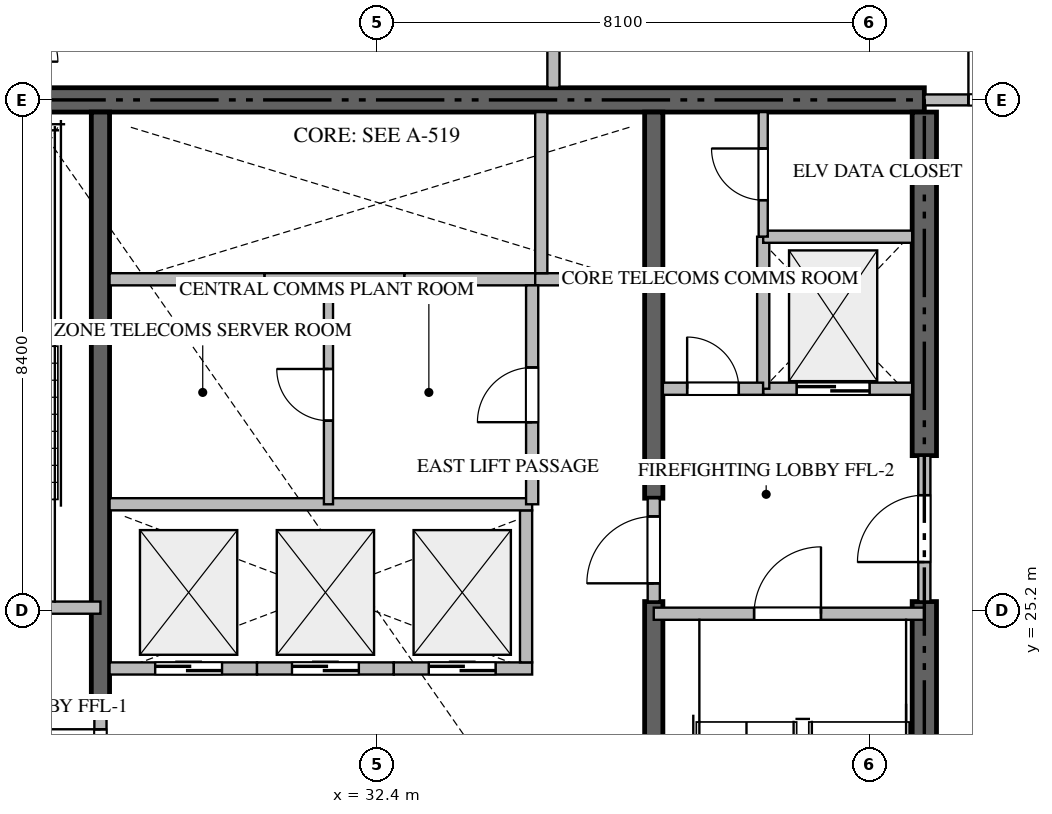
"""IFC4 building model, lengths in metres.
Left out: names, types, materials, properties, quantities, classifications, styles, units other than length and angle.
Written with IfcOpenShell. Run it as: python <this file> out.ifc"""

import sys

from ifc_helpers import new_model, si_unit, direction, frame, frame_2d, origin, place, context, subcontext, project, spatial, rectangle, extrude, source, transform, mapped, element, fill, save


model = new_model("IFC4")
c1 = context("Model", 3, precision=1e-05, world=origin(), true_north=direction((0.0, 1.0)))
c2 = subcontext(c1, "Body", "Model", "MODEL_VIEW")
j1 = project(units=[si_unit("LENGTHUNIT", "METRE"), si_unit("PLANEANGLEUNIT", "RADIAN")], contexts=[c1])
p1 = place(None, origin())
s1 = spatial("IfcSite", under=j1, at=p1, CompositionType="ELEMENT")
p2 = place(p1, origin())
s2 = spatial("IfcBuilding", under=s1, at=p2, CompositionType="ELEMENT")
p3 = place(p2, frame((0.0, 0.0, 150.15)))
s3 = spatial("IfcBuildingStorey", under=s2, at=p3, CompositionType="ELEMENT", Elevation=150.15)
p4 = place(p3, frame((41.4, 33.6, -0.26), z_axis=(0.0, 0.0, 1.0), x_axis=(-1.0, 0.0, 0.0)))
e1 = element("IfcWall", 1, at=p4, inside=s3, PredefinedType="SHEAR", context=c2, shape_type="SweptSolid", body=[
    extrude(rectangle(XDim=18.0, YDim=0.4, at=frame_2d((9.0, 0.0))), origin(), (0.0, 0.0, 1.0), 3.748),
])
p5 = place(p3, frame((41.4, 17.0, -0.26), z_axis=(0.0, 0.0, 1.0), x_axis=(0.0, 1.0, 0.0)))
e2 = element("IfcWall", 2, at=p5, inside=s3, PredefinedType="SHEAR", context=c2, shape_type="SweptSolid", body=[
    extrude(rectangle(XDim=8.35, YDim=0.4, at=frame_2d((4.175, 0.0))), origin(), (0.0, 0.0, 1.0), 3.748),
])
p6 = place(p3, frame((41.4, 27.75, -0.26), z_axis=(0.0, 0.0, 1.0), x_axis=(0.0, 1.0, 0.0)))
e3 = element("IfcWall", 3, at=p6, inside=s3, PredefinedType="SHEAR", context=c2, shape_type="SweptSolid", body=[
    extrude(rectangle(XDim=5.65, YDim=0.4, at=frame_2d((2.825, 0.0))), origin(), (0.0, 0.0, 1.0), 3.748),
])
p7 = place(p3, frame((27.85, 23.55, -0.26), z_axis=(0.0, 0.0, 1.0), x_axis=(0.0, 1.0, 0.0)))
e4 = element("IfcWall", 4, at=p7, inside=s3, PredefinedType="SHEAR", context=c2, shape_type="SweptSolid", body=[
    extrude(rectangle(XDim=9.85, YDim=0.3, at=frame_2d((4.925, 0.0))), origin(), (0.0, 0.0, 1.0), 3.748),
])
p8 = place(p3, frame((36.95, 17.0, -0.26), z_axis=(0.0, 0.0, 1.0), x_axis=(0.0, 1.0, 0.0)))
e5 = element("IfcWall", 5, at=p8, inside=s3, PredefinedType="SHEAR", context=c2, shape_type="SweptSolid", body=[
    extrude(rectangle(XDim=8.35, YDim=0.3, at=frame_2d((4.175, 0.0))), origin(), (0.0, 0.0, 1.0), 3.748),
])
p9 = place(p3, frame((36.95, 27.05, -0.26), z_axis=(0.0, 0.0, 1.0), x_axis=(0.0, 1.0, 0.0)))
e6 = element("IfcWall", 6, at=p9, inside=s3, PredefinedType="SHEAR", context=c2, shape_type="SweptSolid", body=[
    extrude(rectangle(XDim=6.35, YDim=0.3, at=frame_2d((3.175, 0.0))), origin(), (0.0, 0.0, 1.0), 3.748),
])
p10 = place(p3, frame((23.4, 25.25, 0.0), z_axis=(0.0, 0.0, 1.0), x_axis=(1.0, 0.0, 0.0)))
e7 = element("IfcWall", 7, at=p10, inside=s3, PredefinedType="STANDARD", context=c2, shape_type="SweptSolid", body=[
    extrude(rectangle(XDim=4.45, YDim=0.2, at=frame_2d((2.225, 0.0))), origin(), (0.0, 0.0, 1.0), 3.49),
])
p11 = place(p10, frame((1.65, 0.0, 0.0)))
e8 = element("IfcOpeningElement", 8, at=p11, cuts=e7, PredefinedType="OPENING", context=c2, shape_type="SweptSolid", body=[
    extrude(rectangle(XDim=1.1, YDim=2.15, at=frame_2d((0.55, 1.075))), frame((0.0, 0.11, 0.0), z_axis=(0.0, -1.0, 0.0), x_axis=(1.0, 0.0, 0.0)), (0.0, 0.0, 1.0), 0.22),
])
p12 = place(p3, frame((36.95, 25.15, 0.0), z_axis=(0.0, 0.0, 1.0), x_axis=(1.0, 0.0, 0.0)))
e9 = element("IfcWall", 9, at=p12, inside=s3, PredefinedType="STANDARD", context=c2, shape_type="SweptSolid", body=[
    extrude(rectangle(XDim=4.45, YDim=0.2, at=frame_2d((2.225, 0.0))), origin(), (0.0, 0.0, 1.0), 3.49),
])
p13 = place(p12, frame((1.65, 0.0, 0.0)))
e10 = element("IfcOpeningElement", 10, at=p13, cuts=e9, PredefinedType="OPENING", context=c2, shape_type="SweptSolid", body=[
    extrude(rectangle(XDim=1.1, YDim=2.15, at=frame_2d((0.55, 1.075))), frame((0.0, 0.11, 0.0), z_axis=(0.0, -1.0, 0.0), x_axis=(1.0, 0.0, 0.0)), (0.0, 0.0, 1.0), 0.22),
])
p14 = place(p3, frame((38.75, 28.85, 0.0), z_axis=(0.0, 0.0, 1.0), x_axis=(1.0, 0.0, 0.0)))
e11 = element("IfcWall", 11, at=p14, inside=s3, PredefinedType="STANDARD", context=c2, shape_type="SweptSolid", body=[
    extrude(rectangle(XDim=2.45, YDim=0.2, at=frame_2d((1.225, 0.0))), origin(), (0.0, 0.0, 1.0), 3.49),
])
p15 = place(p14, frame((0.55, 0.0, 0.0)))
e12 = element("IfcOpeningElement", 12, at=p15, cuts=e11, PredefinedType="OPENING", context=c2, shape_type="SweptSolid", body=[
    extrude(rectangle(XDim=1.2, YDim=2.2, at=frame_2d((0.6, 1.1))), frame((0.0, 0.11, 0.0), z_axis=(0.0, -1.0, 0.0), x_axis=(1.0, 0.0, 0.0)), (0.0, 0.0, 1.0), 0.22),
])
p16 = place(p3, frame((28.0, 24.25, 0.0), z_axis=(0.0, 0.0, 1.0), x_axis=(1.0, 0.0, 0.0)))
e13 = element("IfcWall", 13, at=p16, inside=s3, PredefinedType="STANDARD", context=c2, shape_type="SweptSolid", body=[
    extrude(rectangle(XDim=2.425, YDim=0.2, at=frame_2d((1.212, 0.0))), origin(), (0.0, 0.0, 1.0), 3.49),
])
p17 = place(p16, frame((0.75, 0.0, 0.0)))
e14 = element("IfcOpeningElement", 14, at=p17, cuts=e13, PredefinedType="OPENING", context=c2, shape_type="SweptSolid", body=[
    extrude(rectangle(XDim=1.1, YDim=2.2, at=frame_2d((0.55, 1.1))), frame((0.0, 0.11, 0.0), z_axis=(0.0, -1.0, 0.0), x_axis=(1.0, 0.0, 0.0)), (0.0, 0.0, 1.0), 0.22),
])
p18 = place(p3, frame((30.425, 24.25, 0.0), z_axis=(0.0, 0.0, 1.0), x_axis=(1.0, 0.0, 0.0)))
e15 = element("IfcWall", 15, at=p18, inside=s3, PredefinedType="STANDARD", context=c2, shape_type="SweptSolid", body=[
    extrude(rectangle(XDim=2.25, YDim=0.2, at=frame_2d((1.125, 0.0))), origin(), (0.0, 0.0, 1.0), 3.49),
])
p19 = place(p18, frame((0.575, 0.0, 0.0)))
e16 = element("IfcOpeningElement", 16, at=p19, cuts=e15, PredefinedType="OPENING", context=c2, shape_type="SweptSolid", body=[
    extrude(rectangle(XDim=1.1, YDim=2.2, at=frame_2d((0.55, 1.1))), frame((0.0, 0.11, 0.0), z_axis=(0.0, -1.0, 0.0), x_axis=(1.0, 0.0, 0.0)), (0.0, 0.0, 1.0), 0.22),
])
p20 = place(p3, frame((32.675, 24.25, 0.0), z_axis=(0.0, 0.0, 1.0), x_axis=(1.0, 0.0, 0.0)))
e17 = element("IfcWall", 17, at=p20, inside=s3, PredefinedType="STANDARD", context=c2, shape_type="SweptSolid", body=[
    extrude(rectangle(XDim=2.275, YDim=0.2, at=frame_2d((1.137, 0.0))), origin(), (0.0, 0.0, 1.0), 3.49),
])
p21 = place(p20, frame((0.575, 0.0, 0.0)))
e18 = element("IfcOpeningElement", 18, at=p21, cuts=e17, PredefinedType="OPENING", context=c2, shape_type="SweptSolid", body=[
    extrude(rectangle(XDim=1.1, YDim=2.2, at=frame_2d((0.55, 1.1))), frame((0.0, 0.11, 0.0), z_axis=(0.0, -1.0, 0.0), x_axis=(1.0, 0.0, 0.0)), (0.0, 0.0, 1.0), 0.22),
])
p22 = place(p3, frame((34.85, 24.35, 0.0), z_axis=(0.0, 0.0, 1.0), x_axis=(0.0, 1.0, 0.0)))
e19 = element("IfcWall", 19, at=p22, inside=s3, PredefinedType="STANDARD", context=c2, shape_type="SweptSolid", body=[
    extrude(rectangle(XDim=2.5, YDim=0.2, at=frame_2d((1.25, 0.0))), origin(), (0.0, 0.0, 1.0), 3.49),
])
p23 = place(p3, frame((28.0, 30.65, 0.0), z_axis=(0.0, 0.0, 1.0), x_axis=(1.0, 0.0, 0.0)))
e20 = element("IfcWall", 20, at=p23, inside=s3, PredefinedType="STANDARD", context=c2, shape_type="SweptSolid", body=[
    extrude(rectangle(XDim=2.55, YDim=0.2, at=frame_2d((1.275, 0.0))), origin(), (0.0, 0.0, 1.0), 3.49),
])
p24 = place(p3, frame((30.55, 30.65, 0.0), z_axis=(0.0, 0.0, 1.0), x_axis=(1.0, 0.0, 0.0)))
e21 = element("IfcWall", 21, at=p24, inside=s3, PredefinedType="STANDARD", context=c2, shape_type="SweptSolid", body=[
    extrude(rectangle(XDim=2.3, YDim=0.2, at=frame_2d((1.15, 0.0))), origin(), (0.0, 0.0, 1.0), 3.49),
])
p25 = place(p3, frame((32.85, 30.65, 0.0), z_axis=(0.0, 0.0, 1.0), x_axis=(1.0, 0.0, 0.0)))
e22 = element("IfcWall", 22, at=p25, inside=s3, PredefinedType="STANDARD", context=c2, shape_type="SweptSolid", body=[
    extrude(rectangle(XDim=2.15, YDim=0.2, at=frame_2d((1.075, 0.0))), origin(), (0.0, 0.0, 1.0), 3.49),
])
p26 = place(p3, frame((35.0, 30.65, 0.0), z_axis=(0.0, 0.0, 1.0), x_axis=(1.0, 0.0, 0.0)))
e23 = element("IfcWall", 23, at=p26, inside=s3, PredefinedType="STANDARD", context=c2, shape_type="SweptSolid", body=[
    extrude(rectangle(XDim=1.8, YDim=0.2, at=frame_2d((0.9, 0.0))), origin(), (0.0, 0.0, 1.0), 3.49),
])
p27 = place(p3, frame((35.1, 30.75, 0.0), z_axis=(0.0, 0.0, 1.0), x_axis=(0.0, 1.0, 0.0)))
e24 = element("IfcWall", 24, at=p27, inside=s3, PredefinedType="STANDARD", context=c2, shape_type="SweptSolid", body=[
    extrude(rectangle(XDim=2.65, YDim=0.2, at=frame_2d((1.325, 0.0))), origin(), (0.0, 0.0, 1.0), 3.49),
])
p28 = place(p3, frame((38.75, 28.85, 0.0), z_axis=(0.0, 0.0, 1.0), x_axis=(0.0, 1.0, 0.0)))
e25 = element("IfcWall", 25, at=p28, inside=s3, PredefinedType="STANDARD", context=c2, shape_type="SweptSolid", body=[
    extrude(rectangle(XDim=2.5, YDim=0.2, at=frame_2d((1.25, 0.0))), origin(), (0.0, 0.0, 1.0), 3.49),
])
p29 = place(p3, frame((38.75, 31.35, 0.0), z_axis=(0.0, 0.0, 1.0), x_axis=(1.0, 0.0, 0.0)))
e26 = element("IfcWall", 26, at=p29, inside=s3, PredefinedType="STANDARD", context=c2, shape_type="SweptSolid", body=[
    extrude(rectangle(XDim=2.45, YDim=0.2, at=frame_2d((1.225, 0.0))), origin(), (0.0, 0.0, 1.0), 3.49),
])
p30 = place(p3, frame((37.1, 28.85, 0.0), z_axis=(0.0, 0.0, 1.0), x_axis=(1.0, 0.0, 0.0)))
e27 = element("IfcWall", 27, at=p30, inside=s3, PredefinedType="STANDARD", context=c2, shape_type="SweptSolid", body=[
    extrude(rectangle(XDim=1.648, YDim=0.2, at=frame_2d((0.824, 0.0))), origin(), (0.0, 0.0, 1.0), 3.49),
])
p31 = place(p30, frame((0.399, 0.0, 0.0)))
e28 = element("IfcOpeningElement", 28, at=p31, cuts=e27, PredefinedType="OPENING", context=c2, shape_type="SweptSolid", body=[
    extrude(rectangle(XDim=0.85, YDim=2.1, at=frame_2d((0.425, 1.05))), frame((0.0, 0.11, 0.0), z_axis=(0.0, -1.0, 0.0), x_axis=(1.0, 0.0, 0.0)), (0.0, 0.0, 1.0), 0.22),
])
p32 = place(p3, frame((41.4, 25.352, 0.0), z_axis=(0.0, 0.0, 1.0), x_axis=(0.0, 1.0, 0.0)))
e29 = element("IfcWall", 29, at=p32, inside=s3, PredefinedType="STANDARD", context=c2, shape_type="SweptSolid", body=[
    extrude(rectangle(XDim=2.396, YDim=0.2, at=frame_2d((1.198, 0.0))), origin(), (0.0, 0.0, 1.0), 3.49),
])
p33 = place(p32, frame((0.648, 0.0, 0.0)))
e30 = element("IfcOpeningElement", 30, at=p33, cuts=e29, PredefinedType="OPENING", context=c2, shape_type="SweptSolid", body=[
    extrude(rectangle(XDim=1.1, YDim=2.15, at=frame_2d((0.55, 1.075))), frame((0.0, 0.11, 0.0), z_axis=(0.0, -1.0, 0.0), x_axis=(1.0, 0.0, 0.0)), (0.0, 0.0, 1.0), 0.22),
])
p34 = place(p3, frame((27.85, 21.852, 0.0), z_axis=(0.0, 0.0, 1.0), x_axis=(0.0, 1.0, 0.0)))
e31 = element("IfcWall", 31, at=p34, inside=s3, PredefinedType="STANDARD", context=c2, shape_type="SweptSolid", body=[
    extrude(rectangle(XDim=1.696, YDim=0.2, at=frame_2d((0.848, 0.0))), origin(), (0.0, 0.0, 1.0), 3.49),
])
p35 = place(p34, frame((0.298, 0.0, 0.0)))
e32 = element("IfcOpeningElement", 32, at=p35, cuts=e31, PredefinedType="OPENING", context=c2, shape_type="SweptSolid", body=[
    extrude(rectangle(XDim=1.1, YDim=2.15, at=frame_2d((0.55, 1.075))), frame((0.0, 0.11, 0.0), z_axis=(0.0, -1.0, 0.0), x_axis=(1.0, 0.0, 0.0)), (0.0, 0.0, 1.0), 0.22),
])
p36 = place(p3, frame((36.95, 25.352, 0.0), z_axis=(0.0, 0.0, 1.0), x_axis=(0.0, 1.0, 0.0)))
e33 = element("IfcWall", 33, at=p36, inside=s3, PredefinedType="STANDARD", context=c2, shape_type="SweptSolid", body=[
    extrude(rectangle(XDim=1.696, YDim=0.2, at=frame_2d((0.848, 0.0))), origin(), (0.0, 0.0, 1.0), 3.49),
])
p37 = place(p36, frame((0.298, 0.0, 0.0)))
e34 = element("IfcOpeningElement", 34, at=p37, cuts=e33, PredefinedType="OPENING", context=c2, shape_type="SweptSolid", body=[
    extrude(rectangle(XDim=1.1, YDim=2.15, at=frame_2d((0.55, 1.075))), frame((0.0, 0.11, 0.0), z_axis=(0.0, -1.0, 0.0), x_axis=(1.0, 0.0, 0.0)), (0.0, 0.0, 1.0), 0.22),
])
p38 = place(p3, frame((28.0, 26.95, 0.0), z_axis=(0.0, 0.0, 1.0), x_axis=(1.0, 0.0, 0.0)))
e35 = element("IfcWall", 35, at=p38, inside=s3, PredefinedType="STANDARD", context=c2, shape_type="SweptSolid", body=[
    extrude(rectangle(XDim=6.95, YDim=0.2, at=frame_2d((3.475, 0.0))), origin(), (0.0, 0.0, 1.0), 3.49),
])
p39 = place(p3, frame((38.75, 31.352, 0.0), z_axis=(0.0, 0.0, 1.0), x_axis=(0.0, 1.0, 0.0)))
e36 = element("IfcWall", 36, at=p39, inside=s3, PredefinedType="PARTITIONING", context=c2, shape_type="SweptSolid", body=[
    extrude(rectangle(XDim=2.048, YDim=0.15, at=frame_2d((1.024, 0.0))), origin(), (0.0, 0.0, 1.0), 3.49),
])
p40 = place(p39, frame((0.599, 0.0, 0.0)))
e37 = element("IfcOpeningElement", 37, at=p40, cuts=e36, PredefinedType="OPENING", context=c2, shape_type="SweptSolid", body=[
    extrude(rectangle(XDim=0.85, YDim=2.1, at=frame_2d((0.425, 1.05))), frame((0.0, 0.085, 0.0), z_axis=(0.0, -1.0, 0.0), x_axis=(1.0, 0.0, 0.0)), (0.0, 0.0, 1.0), 0.17),
])
p41 = place(p3, frame((34.95, 26.95, 0.0), z_axis=(0.0, 0.0, 1.0), x_axis=(0.0, 1.0, 0.0)))
e38 = element("IfcWall", 38, at=p41, inside=s3, PredefinedType="STANDARD", context=c2, shape_type="SweptSolid", body=[
    extrude(rectangle(XDim=3.6, YDim=0.2, at=frame_2d((1.8, 0.0))), origin(), (0.0, 0.0, 1.0), 3.49),
])
p42 = place(p41, frame((1.35, 0.0, 0.0)))
e39 = element("IfcOpeningElement", 39, at=p42, cuts=e38, PredefinedType="OPENING", context=c2, shape_type="SweptSolid", body=[
    extrude(rectangle(XDim=0.9, YDim=2.1, at=frame_2d((0.45, 1.05))), frame((0.0, 0.11, 0.0), z_axis=(0.0, -1.0, 0.0), x_axis=(1.0, 0.0, 0.0)), (0.0, 0.0, 1.0), 0.22),
])
p43 = place(p3, frame((31.6, 26.95, 0.0), z_axis=(0.0, 0.0, 1.0), x_axis=(0.0, 1.0, 0.0)))
e40 = element("IfcWall", 40, at=p43, inside=s3, PredefinedType="PARTITIONING", context=c2, shape_type="SweptSolid", body=[
    extrude(rectangle(XDim=3.6, YDim=0.15, at=frame_2d((1.8, 0.0))), origin(), (0.0, 0.0, 1.0), 3.49),
])
p44 = place(p43, frame((1.375, 0.0, 0.0)))
e41 = element("IfcOpeningElement", 41, at=p44, cuts=e40, PredefinedType="OPENING", context=c2, shape_type="SweptSolid", body=[
    extrude(rectangle(XDim=0.85, YDim=2.1, at=frame_2d((0.425, 1.05))), frame((0.0, 0.085, 0.0), z_axis=(0.0, -1.0, 0.0), x_axis=(1.0, 0.0, 0.0)), (0.0, 0.0, 1.0), 0.17),
])
p45 = place(p3, frame((35.3, 33.8, 0.0), z_axis=(0.0, 0.0, 1.0), x_axis=(0.0, 1.0, 0.0)))
e42 = element("IfcWall", 42, at=p45, inside=s3, PredefinedType="PARTITIONING", context=c2, shape_type="SweptSolid", body=[
    extrude(rectangle(XDim=15.118, YDim=0.2, at=frame_2d((7.559, 0.0))), origin(), (0.0, 0.0, 1.0), 3.49),
])
p46 = place(p3, frame((41.402, 33.6, 0.0), z_axis=(0.0, 0.0, 1.0), x_axis=(1.0, 0.0, 0.0)))
e43 = element("IfcWall", 43, at=p46, inside=s3, PredefinedType="PARTITIONING", context=c2, shape_type="SweptSolid", body=[
    extrude(rectangle(XDim=2.446, YDim=0.18, at=frame_2d((1.223, 0.0))), origin(), (0.0, 0.0, 1.0), 3.49),
])
p47 = place(p46, frame((0.723, 0.0, 0.0)))
e44 = element("IfcOpeningElement", 44, at=p47, cuts=e43, PredefinedType="OPENING", context=c2, shape_type="SweptSolid", body=[
    extrude(rectangle(XDim=1.0, YDim=2.15, at=frame_2d((0.5, 1.075))), frame((0.0, 0.1, 0.0), z_axis=(0.0, -1.0, 0.0), x_axis=(1.0, 0.0, 0.0)), (0.0, 0.0, 1.0), 0.2),
])
m1 = source(origin(), c2, "Body", "SweptSolid", [
    extrude(rectangle(XDim=1.1, YDim=2.15, at=frame_2d((0.55, 1.075))), frame((0.0, 0.025, 0.0), z_axis=(0.0, -1.0, 0.0), x_axis=(1.0, 0.0, 0.0)), (0.0, 0.0, 1.0), 0.05),
])
p48 = place(p13, origin())
e45 = element("IfcDoor", 45, at=p48, inside=s3, OperationType="SINGLE_SWING_RIGHT", PredefinedType="DOOR", context=c2, shape_type="MappedRepresentation", body=[
    mapped(m1, transform((0.0, 0.0, 0.0), scale=1.0)),
])
fill(e10, e45)
m2 = source(origin(), c2, "Body", "SweptSolid", [
    extrude(rectangle(XDim=1.2, YDim=2.2, at=frame_2d((0.6, 1.1))), frame((0.0, 0.025, 0.0), z_axis=(0.0, -1.0, 0.0), x_axis=(1.0, 0.0, 0.0)), (0.0, 0.0, 1.0), 0.05),
])
p49 = place(p15, origin())
e46 = element("IfcDoor", 46, at=p49, inside=s3, OperationType="DOUBLE_DOOR_SLIDING", PredefinedType="DOOR", context=c2, shape_type="MappedRepresentation", body=[
    mapped(m2, transform((0.0, 0.0, 0.0), scale=1.0)),
])
fill(e12, e46)
m3 = source(origin(), c2, "Body", "SweptSolid", [
    extrude(rectangle(XDim=1.1, YDim=2.2, at=frame_2d((0.55, 1.1))), frame((0.0, 0.025, 0.0), z_axis=(0.0, -1.0, 0.0), x_axis=(1.0, 0.0, 0.0)), (0.0, 0.0, 1.0), 0.05),
])
p50 = place(p17, origin())
e47 = element("IfcDoor", 47, at=p50, inside=s3, OperationType="DOUBLE_DOOR_SLIDING", PredefinedType="DOOR", context=c2, shape_type="MappedRepresentation", body=[
    mapped(m3, transform((0.0, 0.0, 0.0), scale=1.0)),
])
fill(e14, e47)
p51 = place(p19, origin())
e48 = element("IfcDoor", 48, at=p51, inside=s3, OperationType="DOUBLE_DOOR_SLIDING", PredefinedType="DOOR", context=c2, shape_type="MappedRepresentation", body=[
    mapped(m3, transform((0.0, 0.0, 0.0), scale=1.0)),
])
fill(e16, e48)
p52 = place(p21, origin())
e49 = element("IfcDoor", 49, at=p52, inside=s3, OperationType="DOUBLE_DOOR_SLIDING", PredefinedType="DOOR", context=c2, shape_type="MappedRepresentation", body=[
    mapped(m3, transform((0.0, 0.0, 0.0), scale=1.0)),
])
fill(e18, e49)
m4 = source(origin(), c2, "Body", "SweptSolid", [
    extrude(rectangle(XDim=0.85, YDim=2.1, at=frame_2d((0.425, 1.05))), frame((0.0, 0.025, 0.0), z_axis=(0.0, -1.0, 0.0), x_axis=(1.0, 0.0, 0.0)), (0.0, 0.0, 1.0), 0.05),
])
p53 = place(p31, origin())
e50 = element("IfcDoor", 50, at=p53, inside=s3, OperationType="SINGLE_SWING_LEFT", PredefinedType="DOOR", context=c2, shape_type="MappedRepresentation", body=[
    mapped(m4, transform((0.0, 0.0, 0.0), scale=1.0)),
])
fill(e28, e50)
p54 = place(p33, origin())
e51 = element("IfcDoor", 51, at=p54, inside=s3, OperationType="SINGLE_SWING_LEFT", PredefinedType="DOOR", context=c2, shape_type="MappedRepresentation", body=[
    mapped(m1, transform((0.0, 0.0, 0.0), scale=1.0)),
])
fill(e30, e51)
p55 = place(p35, origin())
e52 = element("IfcDoor", 52, at=p55, inside=s3, OperationType="SINGLE_SWING_RIGHT", PredefinedType="DOOR", context=c2, shape_type="MappedRepresentation", body=[
    mapped(m1, transform((0.0, 0.0, 0.0), scale=1.0)),
])
fill(e32, e52)
p56 = place(p37, origin())
e53 = element("IfcDoor", 53, at=p56, inside=s3, OperationType="SINGLE_SWING_LEFT", PredefinedType="DOOR", context=c2, shape_type="MappedRepresentation", body=[
    mapped(m1, transform((0.0, 0.0, 0.0), scale=1.0)),
])
fill(e34, e53)
p57 = place(p40, origin())
e54 = element("IfcDoor", 54, at=p57, inside=s3, OperationType="SINGLE_SWING_RIGHT", PredefinedType="DOOR", context=c2, shape_type="MappedRepresentation", body=[
    mapped(m4, transform((0.0, 0.0, 0.0), scale=1.0)),
])
fill(e37, e54)
m5 = source(origin(), c2, "Body", "SweptSolid", [
    extrude(rectangle(XDim=0.9, YDim=2.1, at=frame_2d((0.45, 1.05))), frame((0.0, 0.025, 0.0), z_axis=(0.0, -1.0, 0.0), x_axis=(1.0, 0.0, 0.0)), (0.0, 0.0, 1.0), 0.05),
])
p58 = place(p42, origin())
e55 = element("IfcDoor", 55, at=p58, inside=s3, OperationType="SINGLE_SWING_LEFT", PredefinedType="DOOR", context=c2, shape_type="MappedRepresentation", body=[
    mapped(m5, transform((0.0, 0.0, 0.0), scale=1.0)),
])
fill(e39, e55)
p59 = place(p44, origin())
e56 = element("IfcDoor", 56, at=p59, inside=s3, OperationType="SINGLE_SWING_RIGHT", PredefinedType="DOOR", context=c2, shape_type="MappedRepresentation", body=[
    mapped(m4, transform((0.0, 0.0, 0.0), scale=1.0)),
])
fill(e41, e56)
m6 = source(origin(), c2, "Body", "SweptSolid", [
    extrude(rectangle(XDim=1.0, YDim=2.15, at=frame_2d((0.5, 1.075))), frame((0.0, 0.025, 0.0), z_axis=(0.0, -1.0, 0.0), x_axis=(1.0, 0.0, 0.0)), (0.0, 0.0, 1.0), 0.05),
])
p60 = place(p47, origin())
e57 = element("IfcDoor", 57, at=p60, inside=s3, OperationType="SINGLE_SWING_LEFT", PredefinedType="DOOR", context=c2, shape_type="MappedRepresentation", body=[
    mapped(m6, transform((0.0, 0.0, 0.0), scale=1.0)),
])
fill(e44, e57)
save(model, sys.argv[1])
